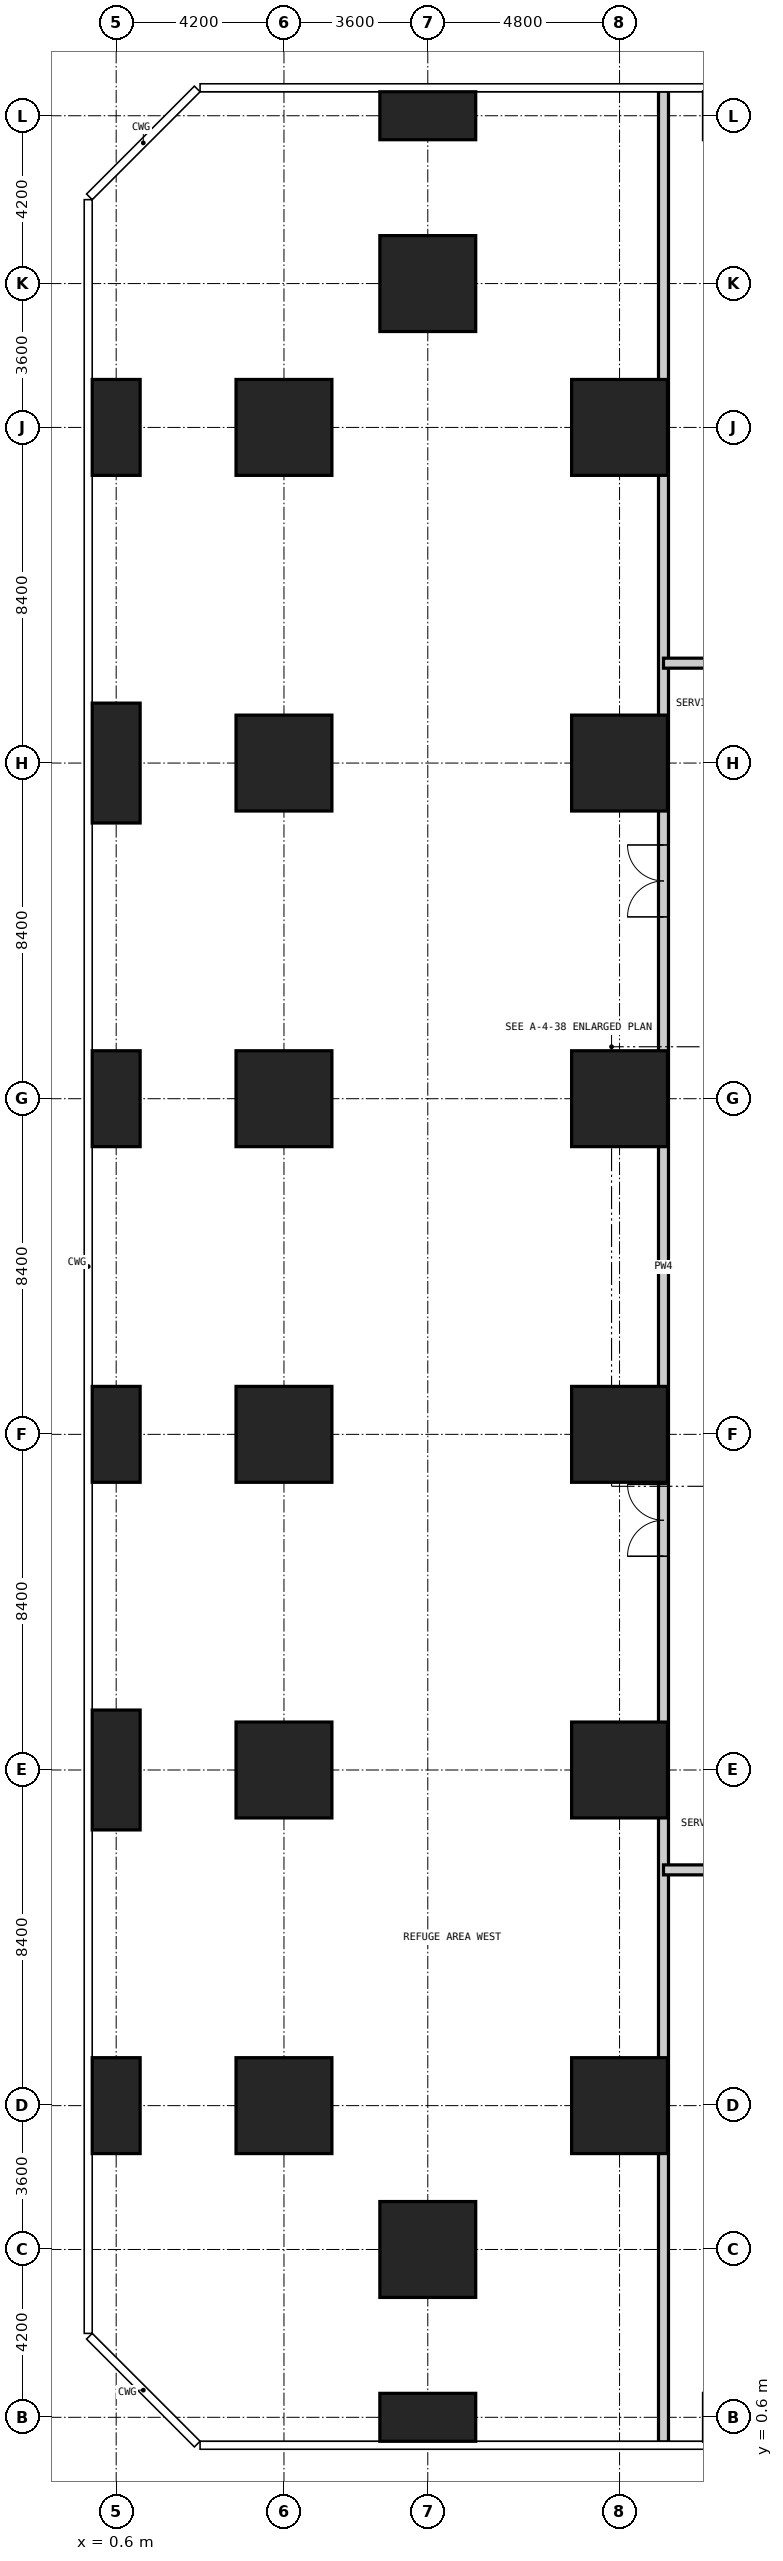
"""IFC4 building model, lengths in metres.
Left out: names, types, materials, properties, quantities, classifications, styles, units other than length and angle.
Written with IfcOpenShell. Run it as: python <this file> out.ifc"""

import sys

from ifc_helpers import new_model, si_unit, direction, frame, frame_2d, origin, origin_2d, place, context, subcontext, project, spatial, rectangle, extrude, element, fill, save


model = new_model("IFC4")
c1 = context("Model", 3, precision=1e-05, world=origin(), true_north=direction((0.0, 1.0)))
c2 = subcontext(c1, "Body", "Model", "MODEL_VIEW")
j1 = project(units=[si_unit("LENGTHUNIT", "METRE"), si_unit("PLANEANGLEUNIT", "RADIAN")], contexts=[c1])
p1 = place(None, origin())
s1 = spatial("IfcSite", under=j1, at=p1, CompositionType="ELEMENT")
p2 = place(p1, origin())
s2 = spatial("IfcBuilding", under=s1, at=p2, CompositionType="ELEMENT")
p3 = place(p2, frame((0.0, 0.0, 88.2)))
s3 = spatial("IfcBuildingStorey", under=s2, at=p3, CompositionType="ELEMENT", Elevation=88.2)
p4 = place(p3, frame((0.6, 8.4, -0.4), z_axis=(0.0, 0.0, 1.0), x_axis=(1.0, 0.0, 0.0)))
e1 = element("IfcColumn", 1, at=p4, inside=s3, PredefinedType="COLUMN", context=c2, shape_type="SweptSolid", body=[
    extrude(rectangle(XDim=1.2, YDim=2.4, at=origin_2d()), origin(), (0.0, 0.0, 1.0), 5.45),
])
p5 = place(p3, frame((0.6, 16.8, -0.4), z_axis=(0.0, 0.0, 1.0), x_axis=(1.0, 0.0, 0.0)))
e2 = element("IfcColumn", 2, at=p5, inside=s3, PredefinedType="COLUMN", context=c2, shape_type="SweptSolid", body=[
    extrude(rectangle(XDim=1.2, YDim=3.0, at=origin_2d()), origin(), (0.0, 0.0, 1.0), 5.45),
])
for number, where, z_axis, x_axis in (
    (3, (0.6, 25.2, -0.4), (0.0, 0.0, 1.0), (1.0, 0.0, 0.0)),
    (4, (0.6, 33.6, -0.4), (0.0, 0.0, 1.0), (1.0, 0.0, 0.0)),
):
    element("IfcColumn", number, at=place(p3, frame(where, z_axis=z_axis, x_axis=x_axis)), inside=s3, PredefinedType="COLUMN", context=c2, shape_type="SweptSolid", body=[
        extrude(rectangle(XDim=1.2, YDim=2.4, at=origin_2d()), origin(), (0.0, 0.0, 1.0), 5.45),
    ])
p6 = place(p3, frame((0.6, 42.0, -0.4), z_axis=(0.0, 0.0, 1.0), x_axis=(1.0, 0.0, 0.0)))
e5 = element("IfcColumn", 5, at=p6, inside=s3, PredefinedType="COLUMN", context=c2, shape_type="SweptSolid", body=[
    extrude(rectangle(XDim=1.2, YDim=3.0, at=origin_2d()), origin(), (0.0, 0.0, 1.0), 5.45),
])
p7 = place(p3, frame((0.6, 50.4, -0.4), z_axis=(0.0, 0.0, 1.0), x_axis=(1.0, 0.0, 0.0)))
e6 = element("IfcColumn", 6, at=p7, inside=s3, PredefinedType="COLUMN", context=c2, shape_type="SweptSolid", body=[
    extrude(rectangle(XDim=1.2, YDim=2.4, at=origin_2d()), origin(), (0.0, 0.0, 1.0), 5.45),
])
for number, where, z_axis, x_axis in (
    (7, (4.8, 8.4, -0.4), (0.0, 0.0, 1.0), (1.0, 0.0, 0.0)),
    (8, (4.8, 16.8, -0.4), (0.0, 0.0, 1.0), (1.0, 0.0, 0.0)),
    (9, (4.8, 25.2, -0.4), (0.0, 0.0, 1.0), (1.0, 0.0, 0.0)),
    (10, (4.8, 33.6, -0.4), (0.0, 0.0, 1.0), (1.0, 0.0, 0.0)),
    (11, (4.8, 42.0, -0.4), (0.0, 0.0, 1.0), (1.0, 0.0, 0.0)),
    (12, (4.8, 50.4, -0.4), (0.0, 0.0, 1.0), (1.0, 0.0, 0.0)),
):
    element("IfcColumn", number, at=place(p3, frame(where, z_axis=z_axis, x_axis=x_axis)), inside=s3, PredefinedType="COLUMN", context=c2, shape_type="SweptSolid", body=[
        extrude(rectangle(XDim=2.4, YDim=2.4, at=origin_2d()), origin(), (0.0, 0.0, 1.0), 5.45),
    ])
p8 = place(p3, frame((8.4, 0.6, -0.4), z_axis=(0.0, 0.0, 1.0), x_axis=(1.0, 0.0, 0.0)))
e13 = element("IfcColumn", 13, at=p8, inside=s3, PredefinedType="COLUMN", context=c2, shape_type="SweptSolid", body=[
    extrude(rectangle(XDim=2.4, YDim=1.2, at=origin_2d()), origin(), (0.0, 0.0, 1.0), 5.45),
])
for number, where, z_axis, x_axis in (
    (14, (8.4, 4.8, -0.4), (0.0, 0.0, 1.0), (1.0, 0.0, 0.0)),
    (15, (8.4, 54.0, -0.4), (0.0, 0.0, 1.0), (1.0, 0.0, 0.0)),
):
    element("IfcColumn", number, at=place(p3, frame(where, z_axis=z_axis, x_axis=x_axis)), inside=s3, PredefinedType="COLUMN", context=c2, shape_type="SweptSolid", body=[
        extrude(rectangle(XDim=2.4, YDim=2.4, at=origin_2d()), origin(), (0.0, 0.0, 1.0), 5.45),
    ])
p9 = place(p3, frame((8.4, 58.2, -0.4), z_axis=(0.0, 0.0, 1.0), x_axis=(1.0, 0.0, 0.0)))
e16 = element("IfcColumn", 16, at=p9, inside=s3, PredefinedType="COLUMN", context=c2, shape_type="SweptSolid", body=[
    extrude(rectangle(XDim=2.4, YDim=1.2, at=origin_2d()), origin(), (0.0, 0.0, 1.0), 5.45),
])
for number, where, z_axis, x_axis in (
    (17, (13.2, 8.4, -0.4), (0.0, 0.0, 1.0), (1.0, 0.0, 0.0)),
    (18, (13.2, 16.8, -0.4), (0.0, 0.0, 1.0), (1.0, 0.0, 0.0)),
    (19, (13.2, 25.2, -0.4), (0.0, 0.0, 1.0), (1.0, 0.0, 0.0)),
    (20, (13.2, 33.6, -0.4), (0.0, 0.0, 1.0), (1.0, 0.0, 0.0)),
    (21, (13.2, 42.0, -0.4), (0.0, 0.0, 1.0), (1.0, 0.0, 0.0)),
    (22, (13.2, 50.4, -0.4), (0.0, 0.0, 1.0), (1.0, 0.0, 0.0)),
):
    element("IfcColumn", number, at=place(p3, frame(where, z_axis=z_axis, x_axis=x_axis)), inside=s3, PredefinedType="COLUMN", context=c2, shape_type="SweptSolid", body=[
        extrude(rectangle(XDim=2.4, YDim=2.4, at=origin_2d()), origin(), (0.0, 0.0, 1.0), 5.45),
    ])
p10 = place(p3, frame((14.3, -0.018, 0.0), z_axis=(0.0, 0.0, 1.0), x_axis=(0.0, 1.0, 0.0)))
e23 = element("IfcWall", 23, at=p10, inside=s3, PredefinedType="PARTITIONING", context=c2, shape_type="SweptSolid", body=[
    extrude(rectangle(XDim=58.836, YDim=0.25, at=frame_2d((29.418, 0.0))), origin(), (0.0, 0.0, 1.0), 5.05),
])
p11 = place(p10, frame((22.168, 0.0, 0.0)))
e24 = element("IfcOpeningElement", 24, at=p11, cuts=e23, PredefinedType="OPENING", context=c2, shape_type="SweptSolid", body=[
    extrude(rectangle(XDim=1.8, YDim=2.4, at=frame_2d((0.9, 1.2))), frame((0.0, 0.135, 0.0), z_axis=(0.0, -1.0, 0.0), x_axis=(1.0, 0.0, 0.0)), (0.0, 0.0, 1.0), 0.27),
])
p12 = place(p10, frame((38.168, 0.0, 0.0)))
e25 = element("IfcOpeningElement", 25, at=p12, cuts=e23, PredefinedType="OPENING", context=c2, shape_type="SweptSolid", body=[
    extrude(rectangle(XDim=1.8, YDim=2.4, at=frame_2d((0.9, 1.2))), frame((0.0, 0.135, 0.0), z_axis=(0.0, -1.0, 0.0), x_axis=(1.0, 0.0, 0.0)), (0.0, 0.0, 1.0), 0.27),
])
p13 = place(p3, frame((14.3, 14.3, 0.0), z_axis=(0.0, 0.0, 1.0), x_axis=(1.0, 0.0, 0.0)))
e26 = element("IfcWall", 26, at=p13, inside=s3, PredefinedType="PARTITIONING", context=c2, shape_type="SweptSolid", body=[
    extrude(rectangle(XDim=30.2, YDim=0.25, at=frame_2d((15.1, 0.0))), origin(), (0.0, 0.0, 1.0), 5.05),
])
p14 = place(p13, frame((19.65, 0.0, 0.0)))
e27 = element("IfcOpeningElement", 27, at=p14, cuts=e26, PredefinedType="OPENING", context=c2, shape_type="SweptSolid", body=[
    extrude(rectangle(XDim=1.8, YDim=2.4, at=frame_2d((0.9, 1.2))), frame((0.0, 0.135, 0.0), z_axis=(0.0, -1.0, 0.0), x_axis=(1.0, 0.0, 0.0)), (0.0, 0.0, 1.0), 0.27),
])
p15 = place(p13, frame((4.55, 0.0, 0.0)))
e28 = element("IfcOpeningElement", 28, at=p15, cuts=e26, PredefinedType="OPENING", context=c2, shape_type="SweptSolid", body=[
    extrude(rectangle(XDim=1.8, YDim=2.4, at=frame_2d((0.9, 1.2))), frame((0.0, 0.135, 0.0), z_axis=(0.0, -1.0, 0.0), x_axis=(1.0, 0.0, 0.0)), (0.0, 0.0, 1.0), 0.27),
])
p16 = place(p3, frame((14.3, 44.5, 0.0), z_axis=(0.0, 0.0, 1.0), x_axis=(1.0, 0.0, 0.0)))
e29 = element("IfcWall", 29, at=p16, inside=s3, PredefinedType="PARTITIONING", context=c2, shape_type="SweptSolid", body=[
    extrude(rectangle(XDim=30.2, YDim=0.25, at=frame_2d((15.1, 0.0))), origin(), (0.0, 0.0, 1.0), 5.05),
])
p17 = place(p16, frame((19.65, 0.0, 0.0)))
e30 = element("IfcOpeningElement", 30, at=p17, cuts=e29, PredefinedType="OPENING", context=c2, shape_type="SweptSolid", body=[
    extrude(rectangle(XDim=1.8, YDim=2.4, at=frame_2d((0.9, 1.2))), frame((0.0, 0.135, 0.0), z_axis=(0.0, -1.0, 0.0), x_axis=(1.0, 0.0, 0.0)), (0.0, 0.0, 1.0), 0.27),
])
p18 = place(p11, origin())
e31 = element("IfcDoor", 31, at=p18, inside=s3, OperationType="DOUBLE_DOOR_DOUBLE_SWING", PredefinedType="DOOR", context=c2, shape_type="SweptSolid", body=[
    extrude(rectangle(XDim=1.8, YDim=2.4, at=frame_2d((0.9, 1.2))), frame((0.0, 0.025, 0.0), z_axis=(0.0, -1.0, 0.0), x_axis=(1.0, 0.0, 0.0)), (0.0, 0.0, 1.0), 0.05),
])
fill(e24, e31)
p19 = place(p12, origin())
e32 = element("IfcDoor", 32, at=p19, inside=s3, OperationType="DOUBLE_DOOR_DOUBLE_SWING", PredefinedType="DOOR", context=c2, shape_type="SweptSolid", body=[
    extrude(rectangle(XDim=1.8, YDim=2.4, at=frame_2d((0.9, 1.2))), frame((0.0, 0.025, 0.0), z_axis=(0.0, -1.0, 0.0), x_axis=(1.0, 0.0, 0.0)), (0.0, 0.0, 1.0), 0.05),
])
fill(e25, e32)
save(model, sys.argv[1])
